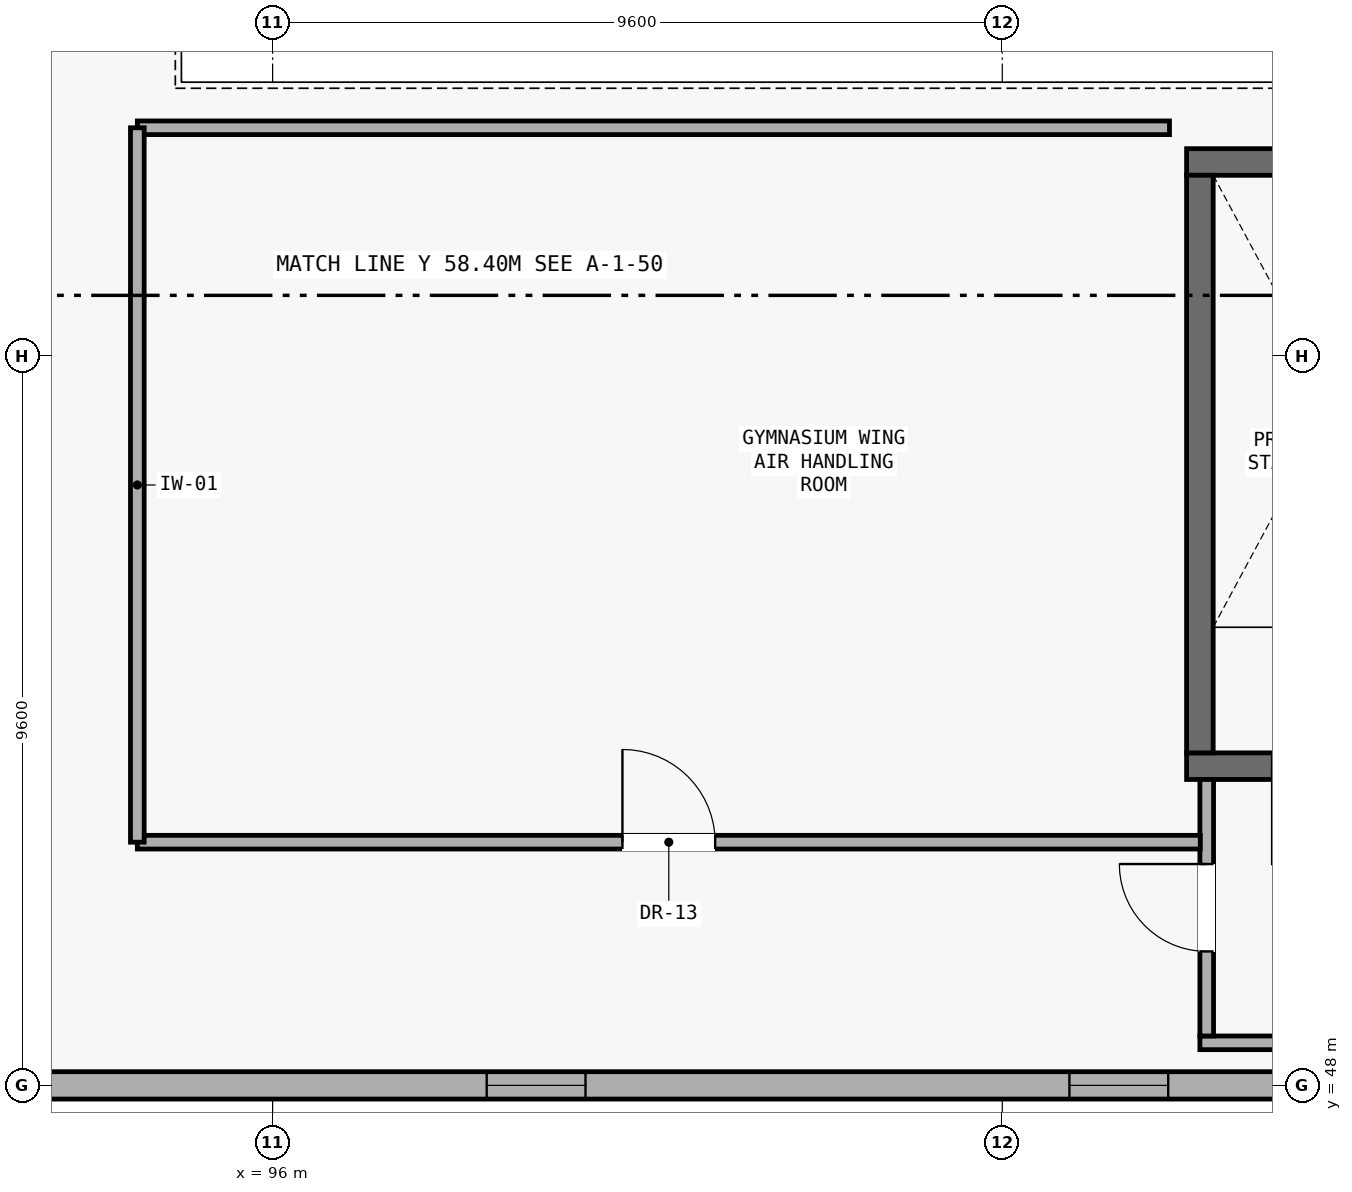
"""IFC4 building model, lengths in metres.
Left out: names, types, materials, properties, quantities, classifications, styles, units other than length and angle.
Written with IfcOpenShell. Run it as: python <this file> out.ifc"""

import sys

from ifc_helpers import new_model, si_unit, direction, frame, frame_2d, origin, place, context, subcontext, project, spatial, rectangle, extrude, element, fill, save


model = new_model("IFC4")
c1 = context("Model", 3, precision=1e-05, world=origin(), true_north=direction((0.0, 1.0)))
c2 = subcontext(c1, "Body", "Model", "MODEL_VIEW")
j1 = project(units=[si_unit("LENGTHUNIT", "METRE"), si_unit("PLANEANGLEUNIT", "RADIAN")], contexts=[c1])
p1 = place(None, origin())
s1 = spatial("IfcSite", under=j1, at=p1, CompositionType="ELEMENT")
p2 = place(p1, origin())
s2 = spatial("IfcBuilding", under=s1, at=p2, CompositionType="ELEMENT")
p3 = place(p2, frame((0.0, 0.0, 13.65)))
s3 = spatial("IfcBuildingStorey", under=s2, at=p3, CompositionType="ELEMENT", Elevation=13.65)
p4 = place(p3, frame((91.408, 48.0, 0.0), z_axis=(0.0, 0.0, 1.0), x_axis=(1.0, 0.0, 0.0)))
e1 = element("IfcWall", 1, at=p4, inside=s3, PredefinedType="SOLIDWALL", context=c2, shape_type="SweptSolid", body=[
    extrude(rectangle(XDim=23.784, YDim=0.36, at=frame_2d((11.892, 0.0))), origin(), (0.0, 0.0, 1.0), 3.205),
])
p5 = place(p4, frame((7.409, 0.0, 0.9)))
e2 = element("IfcOpeningElement", 2, at=p5, cuts=e1, PredefinedType="OPENING", context=c2, shape_type="SweptSolid", body=[
    extrude(rectangle(XDim=1.3, YDim=0.7, at=frame_2d((0.65, 0.35))), frame((0.0, 0.19, 0.0), z_axis=(0.0, -1.0, 0.0), x_axis=(1.0, 0.0, 0.0)), (0.0, 0.0, 1.0), 0.38),
])
p6 = place(p4, frame((15.075, 0.0, 0.9)))
e3 = element("IfcOpeningElement", 3, at=p6, cuts=e1, PredefinedType="OPENING", context=c2, shape_type="SweptSolid", body=[
    extrude(rectangle(XDim=1.3, YDim=0.7, at=frame_2d((0.65, 0.35))), frame((0.0, 0.19, 0.0), z_axis=(0.0, -1.0, 0.0), x_axis=(1.0, 0.0, 0.0)), (0.0, 0.0, 1.0), 0.38),
])
p7 = place(p3, frame((108.025, 52.2, 0.0), z_axis=(0.0, 0.0, 1.0), x_axis=(1.0, 0.0, 0.0)))
e4 = element("IfcWall", 4, at=p7, inside=s3, PredefinedType="SHEAR", context=c2, shape_type="SweptSolid", body=[
    extrude(rectangle(XDim=3.9, YDim=0.35, at=frame_2d((1.95, 0.0))), origin(), (0.0, 0.0, 1.0), 3.98),
])
p8 = place(p7, frame((1.125, 0.0, 0.0)))
e5 = element("IfcOpeningElement", 5, at=p8, cuts=e4, PredefinedType="OPENING", context=c2, shape_type="SweptSolid", body=[
    extrude(rectangle(XDim=1.3, YDim=2.15, at=frame_2d((0.65, 1.075))), frame((0.0, 0.185, 0.0), z_axis=(0.0, -1.0, 0.0), x_axis=(1.0, 0.0, 0.0)), (0.0, 0.0, 1.0), 0.37),
])
p9 = place(p3, frame((108.025, 60.15, 0.0), z_axis=(0.0, 0.0, 1.0), x_axis=(1.0, 0.0, 0.0)))
e6 = element("IfcWall", 6, at=p9, inside=s3, PredefinedType="SHEAR", context=c2, shape_type="SweptSolid", body=[
    extrude(rectangle(XDim=3.9, YDim=0.35, at=frame_2d((1.95, 0.0))), origin(), (0.0, 0.0, 1.0), 3.98),
])
p10 = place(p3, frame((108.2, 52.375, 0.0), z_axis=(0.0, 0.0, 1.0), x_axis=(0.0, 1.0, 0.0)))
e7 = element("IfcWall", 7, at=p10, inside=s3, PredefinedType="SHEAR", context=c2, shape_type="SweptSolid", body=[
    extrude(rectangle(XDim=7.6, YDim=0.35, at=frame_2d((3.8, 0.0))), origin(), (0.0, 0.0, 1.0), 3.98),
])
p11 = place(p3, frame((108.2, 48.56, 0.0), z_axis=(0.0, 0.0, 1.0), x_axis=(1.0, 0.0, 0.0)))
e8 = element("IfcWall", 8, at=p11, inside=s3, PredefinedType="PARTITIONING", context=c2, shape_type="SweptSolid", body=[
    extrude(rectangle(XDim=6.4, YDim=0.18, at=frame_2d((3.2, 0.0))), origin(), (0.0, 0.0, 1.0), 3.98),
])
p12 = place(p3, frame((108.29, 48.65, 0.0), z_axis=(0.0, 0.0, 1.0), x_axis=(0.0, 1.0, 0.0)))
e9 = element("IfcWall", 9, at=p12, inside=s3, PredefinedType="PARTITIONING", context=c2, shape_type="SweptSolid", body=[
    extrude(rectangle(XDim=3.375, YDim=0.18, at=frame_2d((1.688, 0.0))), origin(), (0.0, 0.0, 1.0), 3.98),
])
p13 = place(p12, frame((1.113, 0.0, 0.0)))
e10 = element("IfcOpeningElement", 10, at=p13, cuts=e9, PredefinedType="OPENING", context=c2, shape_type="SweptSolid", body=[
    extrude(rectangle(XDim=1.15, YDim=2.15, at=frame_2d((0.575, 1.075))), frame((0.0, 0.1, 0.0), z_axis=(0.0, -1.0, 0.0), x_axis=(1.0, 0.0, 0.0)), (0.0, 0.0, 1.0), 0.2),
])
p14 = place(p3, frame((94.22, 51.2, 0.0), z_axis=(0.0, 0.0, 1.0), x_axis=(1.0, 0.0, 0.0)))
e11 = element("IfcWall", 11, at=p14, inside=s3, PredefinedType="PARTITIONING", context=c2, shape_type="SweptSolid", body=[
    extrude(rectangle(XDim=13.985, YDim=0.18, at=frame_2d((6.993, 0.0))), origin(), (0.0, 0.0, 1.0), 3.98),
])
p15 = place(p14, frame((6.383, 0.0, 0.0)))
e12 = element("IfcOpeningElement", 12, at=p15, cuts=e11, PredefinedType="OPENING", context=c2, shape_type="SweptSolid", body=[
    extrude(rectangle(XDim=1.22, YDim=2.1, at=frame_2d((0.61, 1.05))), frame((0.0, 0.1, 0.0), z_axis=(0.0, -1.0, 0.0), x_axis=(1.0, 0.0, 0.0)), (0.0, 0.0, 1.0), 0.2),
])
p16 = place(p3, frame((107.8, 60.6, 0.0), z_axis=(0.0, 0.0, 1.0), x_axis=(-1.0, 0.0, 0.0)))
e13 = element("IfcWall", 13, at=p16, inside=s3, PredefinedType="PARTITIONING", context=c2, shape_type="SweptSolid", body=[
    extrude(rectangle(XDim=13.58, YDim=0.18, at=frame_2d((6.79, 0.0))), origin(), (0.0, 0.0, 1.0), 3.98),
])
p17 = place(p3, frame((94.22, 60.6, 0.0), z_axis=(0.0, 0.0, 1.0), x_axis=(0.0, -1.0, 0.0)))
e14 = element("IfcWall", 14, at=p17, inside=s3, PredefinedType="PARTITIONING", context=c2, shape_type="SweptSolid", body=[
    extrude(rectangle(XDim=9.4, YDim=0.18, at=frame_2d((4.7, 0.0))), origin(), (0.0, 0.0, 1.0), 3.98),
])
p18 = place(p5, origin())
e15 = element("IfcWindow", 15, at=p18, inside=s3, PartitioningType="SINGLE_PANEL", PredefinedType="WINDOW", context=c2, shape_type="SweptSolid", body=[
    extrude(rectangle(XDim=1.3, YDim=0.7, at=frame_2d((0.65, 0.35))), frame((0.0, 0.03, 0.0), z_axis=(0.0, -1.0, 0.0), x_axis=(1.0, 0.0, 0.0)), (0.0, 0.0, 1.0), 0.06),
])
fill(e2, e15)
p19 = place(p6, origin())
e16 = element("IfcWindow", 16, at=p19, inside=s3, PartitioningType="SINGLE_PANEL", PredefinedType="WINDOW", context=c2, shape_type="SweptSolid", body=[
    extrude(rectangle(XDim=1.3, YDim=0.7, at=frame_2d((0.65, 0.35))), frame((0.0, 0.03, 0.0), z_axis=(0.0, -1.0, 0.0), x_axis=(1.0, 0.0, 0.0)), (0.0, 0.0, 1.0), 0.06),
])
fill(e3, e16)
p20 = place(p13, origin())
e17 = element("IfcDoor", 17, at=p20, inside=s3, OperationType="SINGLE_SWING_RIGHT", PredefinedType="DOOR", context=c2, shape_type="SweptSolid", body=[
    extrude(rectangle(XDim=1.15, YDim=2.15, at=frame_2d((0.575, 1.075))), frame((0.0, 0.025, 0.0), z_axis=(0.0, -1.0, 0.0), x_axis=(1.0, 0.0, 0.0)), (0.0, 0.0, 1.0), 0.05),
])
fill(e10, e17)
p21 = place(p15, origin())
e18 = element("IfcDoor", 18, at=p21, inside=s3, OperationType="SINGLE_SWING_LEFT", PredefinedType="DOOR", context=c2, shape_type="SweptSolid", body=[
    extrude(rectangle(XDim=1.22, YDim=2.1, at=frame_2d((0.61, 1.05))), frame((0.0, 0.025, 0.0), z_axis=(0.0, -1.0, 0.0), x_axis=(1.0, 0.0, 0.0)), (0.0, 0.0, 1.0), 0.05),
])
fill(e12, e18)
save(model, sys.argv[1])
